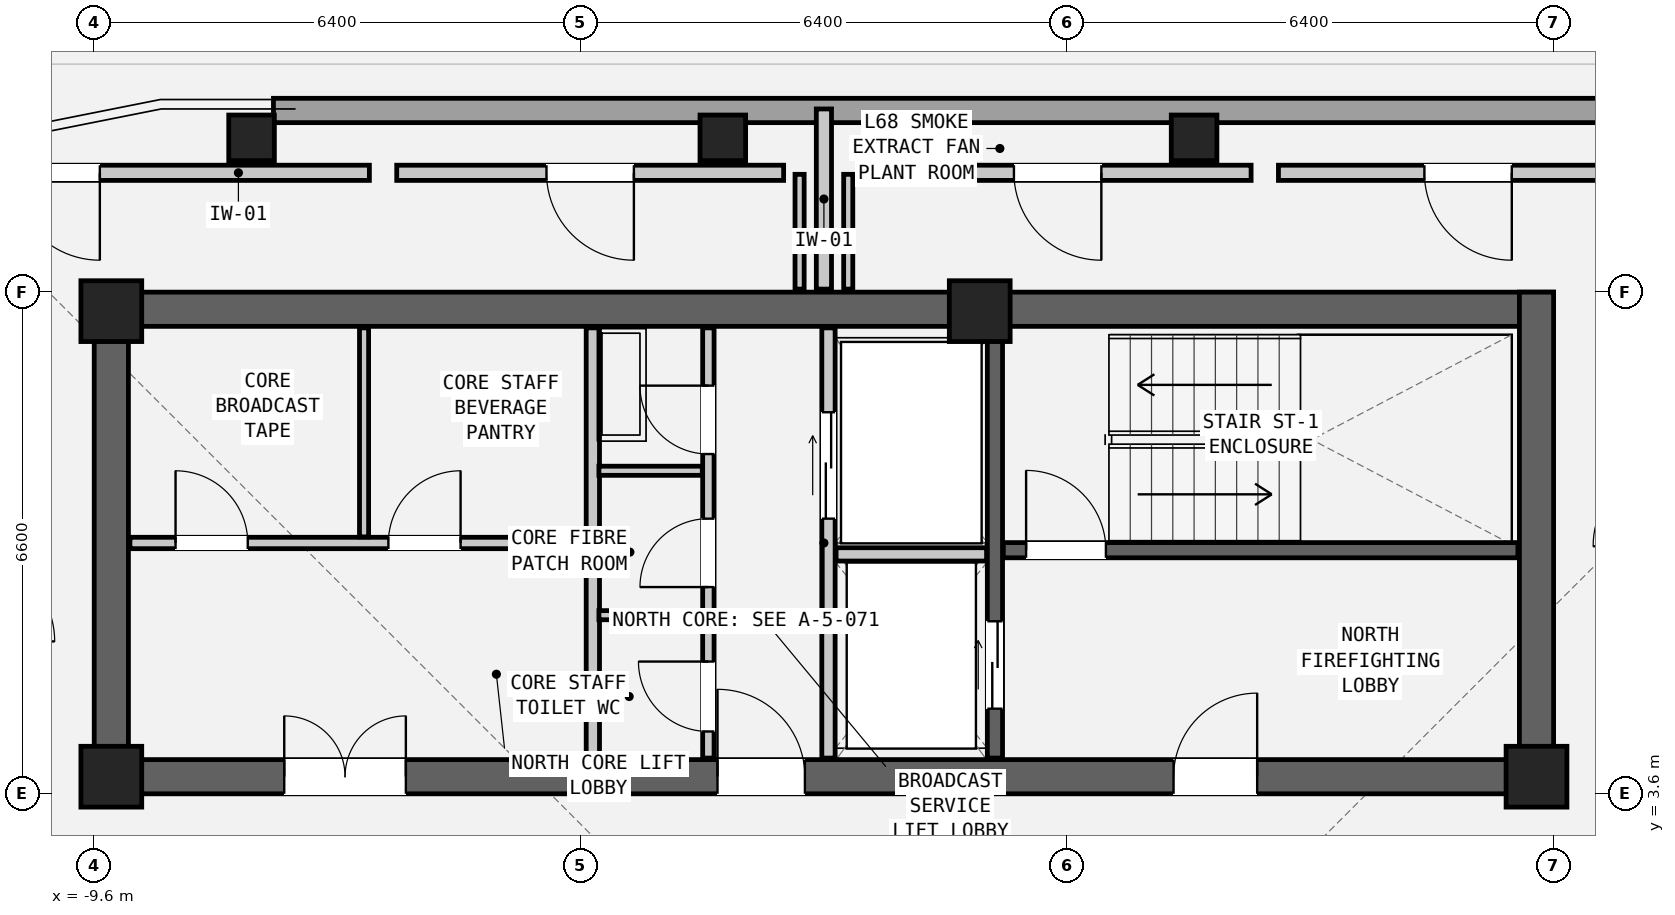
"""IFC4 building model, lengths in metres.
Left out: names, types, materials, properties, quantities, classifications, styles, units other than length and angle.
Written with IfcOpenShell. Run it as: python <this file> out.ifc"""

import sys

from ifc_helpers import new_model, si_unit, direction, frame, frame_2d, origin, origin_2d, place, context, subcontext, project, spatial, rectangle, hollow_rectangle, extrude, element, fill, save


model = new_model("IFC4")
c1 = context("Model", 3, precision=1e-05, world=origin(), true_north=direction((0.0, 1.0)))
c2 = subcontext(c1, "Body", "Model", "MODEL_VIEW")
j1 = project(units=[si_unit("LENGTHUNIT", "METRE"), si_unit("PLANEANGLEUNIT", "RADIAN")], contexts=[c1])
p1 = place(None, origin())
s1 = spatial("IfcSite", under=j1, at=p1, CompositionType="ELEMENT")
p2 = place(p1, origin())
s2 = spatial("IfcBuilding", under=s1, at=p2, CompositionType="ELEMENT")
p3 = place(p2, frame((0.0, 0.0, 231.3)))
s3 = spatial("IfcBuildingStorey", under=s2, at=p3, CompositionType="ELEMENT", Elevation=231.3)
p4 = place(p3, frame((-9.6, 9.975, 0.0), z_axis=(0.0, 0.0, 1.0), x_axis=(1.0, 0.0, 0.0)))
e1 = element("IfcWall", 1, at=p4, inside=s3, PredefinedType="SHEAR", context=c2, shape_type="SweptSolid", body=[
    extrude(rectangle(XDim=19.2, YDim=0.45, at=frame_2d((9.6, 0.0))), origin(), (0.0, 0.0, 1.0), 3.6),
])
p5 = place(p3, frame((-9.6, 3.825, 0.0), z_axis=(0.0, 0.0, 1.0), x_axis=(1.0, 0.0, 0.0)))
e2 = element("IfcWall", 2, at=p5, inside=s3, PredefinedType="SHEAR", context=c2, shape_type="SweptSolid", body=[
    extrude(rectangle(XDim=19.2, YDim=0.45, at=frame_2d((9.6, 0.0))), origin(), (0.0, 0.0, 1.0), 3.6),
])
p6 = place(p5, frame((14.2, 0.0, 0.0)))
e3 = element("IfcOpeningElement", 3, at=p6, cuts=e2, PredefinedType="OPENING", context=c2, shape_type="SweptSolid", body=[
    extrude(rectangle(XDim=1.1, YDim=2.08, at=frame_2d((0.55, 1.04))), frame((0.0, 0.237, 0.0), z_axis=(0.0, -1.0, 0.0), x_axis=(1.0, 0.0, 0.0)), (0.0, 0.0, 1.0), 0.474),
])
p7 = place(p5, frame((8.2, 0.0, 0.0)))
e4 = element("IfcOpeningElement", 4, at=p7, cuts=e2, PredefinedType="OPENING", context=c2, shape_type="SweptSolid", body=[
    extrude(rectangle(XDim=1.15, YDim=2.1, at=frame_2d((0.575, 1.05))), frame((0.0, 0.237, 0.0), z_axis=(0.0, -1.0, 0.0), x_axis=(1.0, 0.0, 0.0)), (0.0, 0.0, 1.0), 0.474),
])
p8 = place(p5, frame((2.5, 0.0, 0.0)))
e5 = element("IfcOpeningElement", 5, at=p8, cuts=e2, PredefinedType="OPENING", context=c2, shape_type="SweptSolid", body=[
    extrude(rectangle(XDim=1.6, YDim=2.12, at=frame_2d((0.8, 1.06))), frame((0.0, 0.237, 0.0), z_axis=(0.0, -1.0, 0.0), x_axis=(1.0, 0.0, 0.0)), (0.0, 0.0, 1.0), 0.474),
])
for number, where, z_axis, x_axis in (
    (6, (-9.375, 3.6, 0.0), (0.0, 0.0, 1.0), (0.0, 1.0, 0.0)),
    (7, (9.375, 3.6, 0.0), (0.0, 0.0, 1.0), (0.0, 1.0, 0.0)),
):
    element("IfcWall", number, at=place(p3, frame(where, z_axis=z_axis, x_axis=x_axis)), inside=s3, PredefinedType="SHEAR", context=c2, shape_type="SweptSolid", body=[
        extrude(rectangle(XDim=6.6, YDim=0.45, at=frame_2d((3.3, 0.0))), origin(), (0.0, 0.0, 1.0), 3.6),
    ])
for number, where, z_axis, x_axis in (
    (8, (4.87, 12.23, 0.0), (0.0, 0.0, 1.0), (1.0, 0.0, 0.0)),
    (9, (-1.33, 12.23, 0.0), (0.0, 0.0, 1.0), (1.0, 0.0, 0.0)),
    (10, (-7.53, 12.23, 0.0), (0.0, 0.0, 1.0), (1.0, 0.0, 0.0)),
):
    element("IfcColumn", number, at=place(p3, frame(where, z_axis=z_axis, x_axis=x_axis)), inside=s3, PredefinedType="COLUMN", context=c2, shape_type="SweptSolid", body=[
        extrude(hollow_rectangle(XDim=0.6, YDim=0.6, WallThickness=0.04, at=origin_2d()), origin(), (0.0, 0.0, 1.0), 3.6),
    ])
for number, where, z_axis, x_axis in (
    (11, (-9.375, 9.95, 0.0), (0.0, 0.0, 1.0), (1.0, 0.0, 0.0)),
    (12, (2.05, 9.95, 0.0), (0.0, 0.0, 1.0), (1.0, 0.0, 0.0)),
    (13, (-9.375, 3.825, 0.0), (0.0, 0.0, 1.0), (1.0, 0.0, 0.0)),
    (14, (9.375, 3.825, 0.0), (0.0, 0.0, 1.0), (1.0, 0.0, 0.0)),
):
    element("IfcColumn", number, at=place(p3, frame(where, z_axis=z_axis, x_axis=x_axis)), inside=s3, PredefinedType="COLUMN", context=c2, shape_type="SweptSolid", body=[
        extrude(rectangle(XDim=0.8, YDim=0.8, at=origin_2d()), origin(), (0.0, 0.0, 1.0), 3.6),
    ])
p9 = place(p3, frame((-7.242, 12.59, 0.0), z_axis=(0.0, 0.0, 1.0), x_axis=(1.0, 0.0, 0.0)))
e15 = element("IfcWall", 15, at=p9, inside=s3, PredefinedType="SOLIDWALL", context=c2, shape_type="SweptSolid", body=[
    extrude(rectangle(XDim=18.024, YDim=0.32, at=frame_2d((9.012, 0.0))), origin(), (0.0, 0.0, 1.0), 2.182),
])
p10 = place(p3, frame((2.36, 6.805, 0.0), z_axis=(0.0, 0.0, 1.0), x_axis=(1.0, 0.0, 0.0)))
e16 = element("IfcWall", 16, at=p10, inside=s3, PredefinedType="SHEAR", context=c2, shape_type="SweptSolid", body=[
    extrude(rectangle(XDim=6.77, YDim=0.2, at=frame_2d((3.385, 0.0))), origin(), (0.0, 0.0, 1.0), 3.32),
])
p11 = place(p10, frame((0.3, 0.0, 0.0)))
e17 = element("IfcOpeningElement", 17, at=p11, cuts=e16, PredefinedType="OPENING", context=c2, shape_type="SweptSolid", body=[
    extrude(rectangle(XDim=1.05, YDim=2.08, at=frame_2d((0.525, 1.04))), frame((0.0, 0.112, 0.0), z_axis=(0.0, -1.0, 0.0), x_axis=(1.0, 0.0, 0.0)), (0.0, 0.0, 1.0), 0.224),
])
p12 = place(p3, frame((2.25, 4.07, 0.0), z_axis=(0.0, 0.0, 1.0), x_axis=(0.0, 1.0, 0.0)))
e18 = element("IfcWall", 18, at=p12, inside=s3, PredefinedType="SHEAR", context=c2, shape_type="SweptSolid", body=[
    extrude(rectangle(XDim=5.66, YDim=0.2, at=frame_2d((2.83, 0.0))), origin(), (0.0, 0.0, 1.0), 3.32),
])
p13 = place(p12, frame((0.65, 0.0, 0.0)))
e19 = element("IfcOpeningElement", 19, at=p13, cuts=e18, PredefinedType="OPENING", context=c2, shape_type="SweptSolid", body=[
    extrude(rectangle(XDim=1.15, YDim=2.08, at=frame_2d((0.575, 1.04))), frame((0.0, 0.112, 0.0), z_axis=(0.0, -1.0, 0.0), x_axis=(1.0, 0.0, 0.0)), (0.0, 0.0, 1.0), 0.224),
])
p14 = place(p3, frame((0.06, 4.07, 0.0), z_axis=(0.0, 0.0, 1.0), x_axis=(0.0, 1.0, 0.0)))
e20 = element("IfcWall", 20, at=p14, inside=s3, PredefinedType="PARTITIONING", context=c2, shape_type="SweptSolid", body=[
    extrude(rectangle(XDim=5.66, YDim=0.175, at=frame_2d((2.83, 0.0))), origin(), (0.0, 0.0, 1.0), 3.32),
])
p15 = place(p14, frame((3.15, 0.0, 0.0)))
e21 = element("IfcOpeningElement", 21, at=p15, cuts=e20, PredefinedType="OPENING", context=c2, shape_type="SweptSolid", body=[
    extrude(rectangle(XDim=1.4, YDim=2.12, at=frame_2d((0.7, 1.06))), frame((0.0, 0.1, 0.0), z_axis=(0.0, -1.0, 0.0), x_axis=(1.0, 0.0, 0.0)), (0.0, 0.0, 1.0), 0.199),
])
p16 = place(p3, frame((0.16, 6.75, 0.0), z_axis=(0.0, 0.0, 1.0), x_axis=(1.0, 0.0, 0.0)))
e22 = element("IfcWall", 22, at=p16, inside=s3, PredefinedType="PARTITIONING", context=c2, shape_type="SweptSolid", body=[
    extrude(rectangle(XDim=1.98, YDim=0.175, at=frame_2d((0.99, 0.0))), origin(), (0.0, 0.0, 1.0), 3.32),
])
p17 = place(p3, frame((-3.04, 4.07, 0.0), z_axis=(0.0, 0.0, 1.0), x_axis=(0.0, 1.0, 0.0)))
e23 = element("IfcWall", 23, at=p17, inside=s3, PredefinedType="PARTITIONING", context=c2, shape_type="SweptSolid", body=[
    extrude(rectangle(XDim=5.66, YDim=0.175, at=frame_2d((2.83, 0.0))), origin(), (0.0, 0.0, 1.0), 3.32),
])
p18 = place(p3, frame((-1.52, 4.07, 0.0), z_axis=(0.0, 0.0, 1.0), x_axis=(0.0, 1.0, 0.0)))
e24 = element("IfcWall", 24, at=p18, inside=s3, PredefinedType="PARTITIONING", context=c2, shape_type="SweptSolid", body=[
    extrude(rectangle(XDim=5.66, YDim=0.15, at=frame_2d((2.83, 0.0))), origin(), (0.0, 0.0, 1.0), 3.32),
])
p19 = place(p18, frame((4.0, 0.0, 0.0)))
e25 = element("IfcOpeningElement", 25, at=p19, cuts=e24, PredefinedType="OPENING", context=c2, shape_type="SweptSolid", body=[
    extrude(rectangle(XDim=0.9, YDim=2.05, at=frame_2d((0.45, 1.025))), frame((0.0, 0.087, 0.0), z_axis=(0.0, -1.0, 0.0), x_axis=(1.0, 0.0, 0.0)), (0.0, 0.0, 1.0), 0.174),
])
p20 = place(p18, frame((2.25, 0.0, 0.0)))
e26 = element("IfcOpeningElement", 26, at=p20, cuts=e24, PredefinedType="OPENING", context=c2, shape_type="SweptSolid", body=[
    extrude(rectangle(XDim=0.9, YDim=2.05, at=frame_2d((0.45, 1.025))), frame((0.0, 0.087, 0.0), z_axis=(0.0, -1.0, 0.0), x_axis=(1.0, 0.0, 0.0)), (0.0, 0.0, 1.0), 0.174),
])
p21 = place(p18, frame((0.35, 0.0, 0.0)))
e27 = element("IfcOpeningElement", 27, at=p21, cuts=e24, PredefinedType="OPENING", context=c2, shape_type="SweptSolid", body=[
    extrude(rectangle(XDim=0.92, YDim=2.1, at=frame_2d((0.46, 1.05))), frame((0.0, 0.087, 0.0), z_axis=(0.0, -1.0, 0.0), x_axis=(1.0, 0.0, 0.0)), (0.0, 0.0, 1.0), 0.174),
])
for number, where, z_axis, x_axis in (
    (28, (-2.96, 5.95, 0.0), (0.0, 0.0, 1.0), (1.0, 0.0, 0.0)),
    (29, (-2.96, 7.85, 0.0), (0.0, 0.0, 1.0), (1.0, 0.0, 0.0)),
):
    element("IfcWall", number, at=place(p3, frame(where, z_axis=z_axis, x_axis=x_axis)), inside=s3, PredefinedType="PARTITIONING", context=c2, shape_type="SweptSolid", body=[
        extrude(rectangle(XDim=1.36, YDim=0.12, at=frame_2d((0.68, 0.0))), origin(), (0.0, 0.0, 1.0), 3.32),
    ])
p22 = place(p3, frame((-9.13, 6.9, 0.0), z_axis=(0.0, 0.0, 1.0), x_axis=(1.0, 0.0, 0.0)))
e30 = element("IfcWall", 30, at=p22, inside=s3, PredefinedType="PARTITIONING", context=c2, shape_type="SweptSolid", body=[
    extrude(rectangle(XDim=6.01, YDim=0.15, at=frame_2d((3.005, 0.0))), origin(), (0.0, 0.0, 1.0), 3.32),
])
p23 = place(p22, frame((0.6, 0.0, 0.0)))
e31 = element("IfcOpeningElement", 31, at=p23, cuts=e30, PredefinedType="OPENING", context=c2, shape_type="SweptSolid", body=[
    extrude(rectangle(XDim=0.95, YDim=2.1, at=frame_2d((0.475, 1.05))), frame((0.0, 0.087, 0.0), z_axis=(0.0, -1.0, 0.0), x_axis=(1.0, 0.0, 0.0)), (0.0, 0.0, 1.0), 0.174),
])
p24 = place(p22, frame((3.4, 0.0, 0.0)))
e32 = element("IfcOpeningElement", 32, at=p24, cuts=e30, PredefinedType="OPENING", context=c2, shape_type="SweptSolid", body=[
    extrude(rectangle(XDim=0.95, YDim=2.1, at=frame_2d((0.475, 1.05))), frame((0.0, 0.087, 0.0), z_axis=(0.0, -1.0, 0.0), x_axis=(1.0, 0.0, 0.0)), (0.0, 0.0, 1.0), 0.174),
])
p25 = place(p3, frame((-6.05, 6.98, 0.0), z_axis=(0.0, 0.0, 1.0), x_axis=(0.0, 1.0, 0.0)))
e33 = element("IfcWall", 33, at=p25, inside=s3, PredefinedType="PARTITIONING", context=c2, shape_type="SweptSolid", body=[
    extrude(rectangle(XDim=2.75, YDim=0.12, at=frame_2d((1.375, 0.0))), origin(), (0.0, 0.0, 1.0), 3.32),
])
p26 = place(p3, frame((0.0, 10.24, 0.0), z_axis=(0.0, 0.0, 1.0), x_axis=(0.0, 1.0, 0.0)))
e34 = element("IfcWall", 34, at=p26, inside=s3, PredefinedType="PARTITIONING", context=c2, shape_type="SweptSolid", body=[
    extrude(rectangle(XDim=2.37, YDim=0.2, at=frame_2d((1.185, 0.0))), origin(), (0.0, 0.0, 1.0), 2.538),
])
for number, where, z_axis, x_axis in (
    (35, (-0.32, 10.24, 0.0), (0.0, 0.0, 1.0), (0.0, 1.0, 0.0)),
    (36, (0.32, 10.24, 0.0), (0.0, 0.0, 1.0), (0.0, 1.0, 0.0)),
):
    element("IfcWall", number, at=place(p3, frame(where, z_axis=z_axis, x_axis=x_axis)), inside=s3, PredefinedType="PARTITIONING", context=c2, shape_type="SweptSolid", body=[
        extrude(rectangle(XDim=1.51, YDim=0.12, at=frame_2d((0.755, 0.0))), origin(), (0.0, 0.0, 1.0), 2.538),
    ])
p27 = place(p3, frame((-5.98, 11.77, 0.0), z_axis=(0.0, 0.0, 1.0), x_axis=(-1.0, 0.0, 0.0)))
e37 = element("IfcWall", 37, at=p27, inside=s3, PredefinedType="PARTITIONING", context=c2, shape_type="SweptSolid", body=[
    extrude(rectangle(XDim=5.046, YDim=0.2, at=frame_2d((2.523, 0.0))), origin(), (0.0, 0.0, 1.0), 2.182),
])
p28 = place(p27, frame((3.546, 0.0, 0.0)))
e38 = element("IfcOpeningElement", 38, at=p28, cuts=e37, PredefinedType="OPENING", context=c2, shape_type="SweptSolid", body=[
    extrude(rectangle(XDim=1.15, YDim=2.1, at=frame_2d((0.575, 1.05))), frame((0.0, 0.112, 0.0), z_axis=(0.0, -1.0, 0.0), x_axis=(1.0, 0.0, 0.0)), (0.0, 0.0, 1.0), 0.224),
])
p29 = place(p3, frame((-0.53, 11.77, 0.0), z_axis=(0.0, 0.0, 1.0), x_axis=(-1.0, 0.0, 0.0)))
e39 = element("IfcWall", 39, at=p29, inside=s3, PredefinedType="PARTITIONING", context=c2, shape_type="SweptSolid", body=[
    extrude(rectangle(XDim=5.09, YDim=0.2, at=frame_2d((2.545, 0.0))), origin(), (0.0, 0.0, 1.0), 2.182),
])
p30 = place(p29, frame((1.97, 0.0, 0.0)))
e40 = element("IfcOpeningElement", 40, at=p30, cuts=e39, PredefinedType="OPENING", context=c2, shape_type="SweptSolid", body=[
    extrude(rectangle(XDim=1.15, YDim=2.1, at=frame_2d((0.575, 1.05))), frame((0.0, 0.112, 0.0), z_axis=(0.0, -1.0, 0.0), x_axis=(1.0, 0.0, 0.0)), (0.0, 0.0, 1.0), 0.224),
])
p31 = place(p3, frame((5.62, 11.77, 0.0), z_axis=(0.0, 0.0, 1.0), x_axis=(-1.0, 0.0, 0.0)))
e41 = element("IfcWall", 41, at=p31, inside=s3, PredefinedType="PARTITIONING", context=c2, shape_type="SweptSolid", body=[
    extrude(rectangle(XDim=5.09, YDim=0.2, at=frame_2d((2.545, 0.0))), origin(), (0.0, 0.0, 1.0), 2.182),
])
p32 = place(p31, frame((1.97, 0.0, 0.0)))
e42 = element("IfcOpeningElement", 42, at=p32, cuts=e41, PredefinedType="OPENING", context=c2, shape_type="SweptSolid", body=[
    extrude(rectangle(XDim=1.15, YDim=2.1, at=frame_2d((0.575, 1.05))), frame((0.0, 0.112, 0.0), z_axis=(0.0, -1.0, 0.0), x_axis=(1.0, 0.0, 0.0)), (0.0, 0.0, 1.0), 0.224),
])
p33 = place(p3, frame((10.97, 11.77, 0.0), z_axis=(0.0, 0.0, 1.0), x_axis=(-1.0, 0.0, 0.0)))
e43 = element("IfcWall", 43, at=p33, inside=s3, PredefinedType="PARTITIONING", context=c2, shape_type="SweptSolid", body=[
    extrude(rectangle(XDim=4.99, YDim=0.2, at=frame_2d((2.495, 0.0))), origin(), (0.0, 0.0, 1.0), 2.182),
])
p34 = place(p33, frame((1.92, 0.0, 0.0)))
e44 = element("IfcOpeningElement", 44, at=p34, cuts=e43, PredefinedType="OPENING", context=c2, shape_type="SweptSolid", body=[
    extrude(rectangle(XDim=1.15, YDim=2.1, at=frame_2d((0.575, 1.05))), frame((0.0, 0.112, 0.0), z_axis=(0.0, -1.0, 0.0), x_axis=(1.0, 0.0, 0.0)), (0.0, 0.0, 1.0), 0.224),
])
p35 = place(p11, origin())
e45 = element("IfcDoor", 45, at=p35, inside=s3, OperationType="SINGLE_SWING_LEFT", PredefinedType="DOOR", context=c2, shape_type="SweptSolid", body=[
    extrude(rectangle(XDim=1.05, YDim=2.08, at=frame_2d((0.525, 1.04))), frame((0.0, 0.025, 0.0), z_axis=(0.0, -1.0, 0.0), x_axis=(1.0, 0.0, 0.0)), (0.0, 0.0, 1.0), 0.05),
])
fill(e17, e45)
p36 = place(p6, origin())
e46 = element("IfcDoor", 46, at=p36, inside=s3, OperationType="SINGLE_SWING_RIGHT", PredefinedType="DOOR", context=c2, shape_type="SweptSolid", body=[
    extrude(rectangle(XDim=1.1, YDim=2.08, at=frame_2d((0.55, 1.04))), frame((0.0, 0.025, 0.0), z_axis=(0.0, -1.0, 0.0), x_axis=(1.0, 0.0, 0.0)), (0.0, 0.0, 1.0), 0.05),
])
fill(e3, e46)
p37 = place(p13, origin())
e47 = element("IfcDoor", 47, at=p37, inside=s3, OperationType="DOUBLE_DOOR_SLIDING", PredefinedType="DOOR", context=c2, shape_type="SweptSolid", body=[
    extrude(rectangle(XDim=1.15, YDim=2.08, at=frame_2d((0.575, 1.04))), frame((0.0, 0.025, 0.0), z_axis=(0.0, -1.0, 0.0), x_axis=(1.0, 0.0, 0.0)), (0.0, 0.0, 1.0), 0.05),
])
fill(e19, e47)
p38 = place(p15, origin())
e48 = element("IfcDoor", 48, at=p38, inside=s3, OperationType="DOUBLE_DOOR_SLIDING", PredefinedType="DOOR", context=c2, shape_type="SweptSolid", body=[
    extrude(rectangle(XDim=1.4, YDim=2.12, at=frame_2d((0.7, 1.06))), frame((0.0, 0.025, 0.0), z_axis=(0.0, -1.0, 0.0), x_axis=(1.0, 0.0, 0.0)), (0.0, 0.0, 1.0), 0.05),
])
fill(e21, e48)
p39 = place(p7, origin())
e49 = element("IfcDoor", 49, at=p39, inside=s3, OperationType="SINGLE_SWING_LEFT", PredefinedType="DOOR", context=c2, shape_type="SweptSolid", body=[
    extrude(rectangle(XDim=1.15, YDim=2.1, at=frame_2d((0.575, 1.05))), frame((0.0, 0.025, 0.0), z_axis=(0.0, -1.0, 0.0), x_axis=(1.0, 0.0, 0.0)), (0.0, 0.0, 1.0), 0.05),
])
fill(e4, e49)
p40 = place(p19, origin())
e50 = element("IfcDoor", 50, at=p40, inside=s3, OperationType="SINGLE_SWING_RIGHT", PredefinedType="DOOR", context=c2, shape_type="SweptSolid", body=[
    extrude(rectangle(XDim=0.9, YDim=2.05, at=frame_2d((0.45, 1.025))), frame((0.0, 0.025, 0.0), z_axis=(0.0, -1.0, 0.0), x_axis=(1.0, 0.0, 0.0)), (0.0, 0.0, 1.0), 0.05),
])
fill(e25, e50)
p41 = place(p20, origin())
e51 = element("IfcDoor", 51, at=p41, inside=s3, OperationType="SINGLE_SWING_LEFT", PredefinedType="DOOR", context=c2, shape_type="SweptSolid", body=[
    extrude(rectangle(XDim=0.9, YDim=2.05, at=frame_2d((0.45, 1.025))), frame((0.0, 0.025, 0.0), z_axis=(0.0, -1.0, 0.0), x_axis=(1.0, 0.0, 0.0)), (0.0, 0.0, 1.0), 0.05),
])
fill(e26, e51)
p42 = place(p21, origin())
e52 = element("IfcDoor", 52, at=p42, inside=s3, OperationType="SINGLE_SWING_RIGHT", PredefinedType="DOOR", context=c2, shape_type="SweptSolid", body=[
    extrude(rectangle(XDim=0.92, YDim=2.1, at=frame_2d((0.46, 1.05))), frame((0.0, 0.025, 0.0), z_axis=(0.0, -1.0, 0.0), x_axis=(1.0, 0.0, 0.0)), (0.0, 0.0, 1.0), 0.05),
])
fill(e27, e52)
p43 = place(p8, origin())
e53 = element("IfcDoor", 53, at=p43, inside=s3, OperationType="DOUBLE_DOOR_SINGLE_SWING", PredefinedType="DOOR", context=c2, shape_type="SweptSolid", body=[
    extrude(rectangle(XDim=1.6, YDim=2.12, at=frame_2d((0.8, 1.06))), frame((0.0, 0.025, 0.0), z_axis=(0.0, -1.0, 0.0), x_axis=(1.0, 0.0, 0.0)), (0.0, 0.0, 1.0), 0.05),
])
fill(e5, e53)
p44 = place(p23, origin())
e54 = element("IfcDoor", 54, at=p44, inside=s3, OperationType="SINGLE_SWING_LEFT", PredefinedType="DOOR", context=c2, shape_type="SweptSolid", body=[
    extrude(rectangle(XDim=0.95, YDim=2.1, at=frame_2d((0.475, 1.05))), frame((0.0, 0.025, 0.0), z_axis=(0.0, -1.0, 0.0), x_axis=(1.0, 0.0, 0.0)), (0.0, 0.0, 1.0), 0.05),
])
fill(e31, e54)
p45 = place(p24, origin())
e55 = element("IfcDoor", 55, at=p45, inside=s3, OperationType="SINGLE_SWING_RIGHT", PredefinedType="DOOR", context=c2, shape_type="SweptSolid", body=[
    extrude(rectangle(XDim=0.95, YDim=2.1, at=frame_2d((0.475, 1.05))), frame((0.0, 0.025, 0.0), z_axis=(0.0, -1.0, 0.0), x_axis=(1.0, 0.0, 0.0)), (0.0, 0.0, 1.0), 0.05),
])
fill(e32, e55)
p46 = place(p28, origin())
e56 = element("IfcDoor", 56, at=p46, inside=s3, OperationType="SINGLE_SWING_LEFT", PredefinedType="DOOR", context=c2, shape_type="SweptSolid", body=[
    extrude(rectangle(XDim=1.15, YDim=2.1, at=frame_2d((0.575, 1.05))), frame((0.0, 0.025, 0.0), z_axis=(0.0, -1.0, 0.0), x_axis=(1.0, 0.0, 0.0)), (0.0, 0.0, 1.0), 0.05),
])
fill(e38, e56)
p47 = place(p30, origin())
e57 = element("IfcDoor", 57, at=p47, inside=s3, OperationType="SINGLE_SWING_LEFT", PredefinedType="DOOR", context=c2, shape_type="SweptSolid", body=[
    extrude(rectangle(XDim=1.15, YDim=2.1, at=frame_2d((0.575, 1.05))), frame((0.0, 0.025, 0.0), z_axis=(0.0, -1.0, 0.0), x_axis=(1.0, 0.0, 0.0)), (0.0, 0.0, 1.0), 0.05),
])
fill(e40, e57)
p48 = place(p32, origin())
e58 = element("IfcDoor", 58, at=p48, inside=s3, OperationType="SINGLE_SWING_LEFT", PredefinedType="DOOR", context=c2, shape_type="SweptSolid", body=[
    extrude(rectangle(XDim=1.15, YDim=2.1, at=frame_2d((0.575, 1.05))), frame((0.0, 0.025, 0.0), z_axis=(0.0, -1.0, 0.0), x_axis=(1.0, 0.0, 0.0)), (0.0, 0.0, 1.0), 0.05),
])
fill(e42, e58)
p49 = place(p34, origin())
e59 = element("IfcDoor", 59, at=p49, inside=s3, OperationType="SINGLE_SWING_LEFT", PredefinedType="DOOR", context=c2, shape_type="SweptSolid", body=[
    extrude(rectangle(XDim=1.15, YDim=2.1, at=frame_2d((0.575, 1.05))), frame((0.0, 0.025, 0.0), z_axis=(0.0, -1.0, 0.0), x_axis=(1.0, 0.0, 0.0)), (0.0, 0.0, 1.0), 0.05),
])
fill(e44, e59)
save(model, sys.argv[1])
